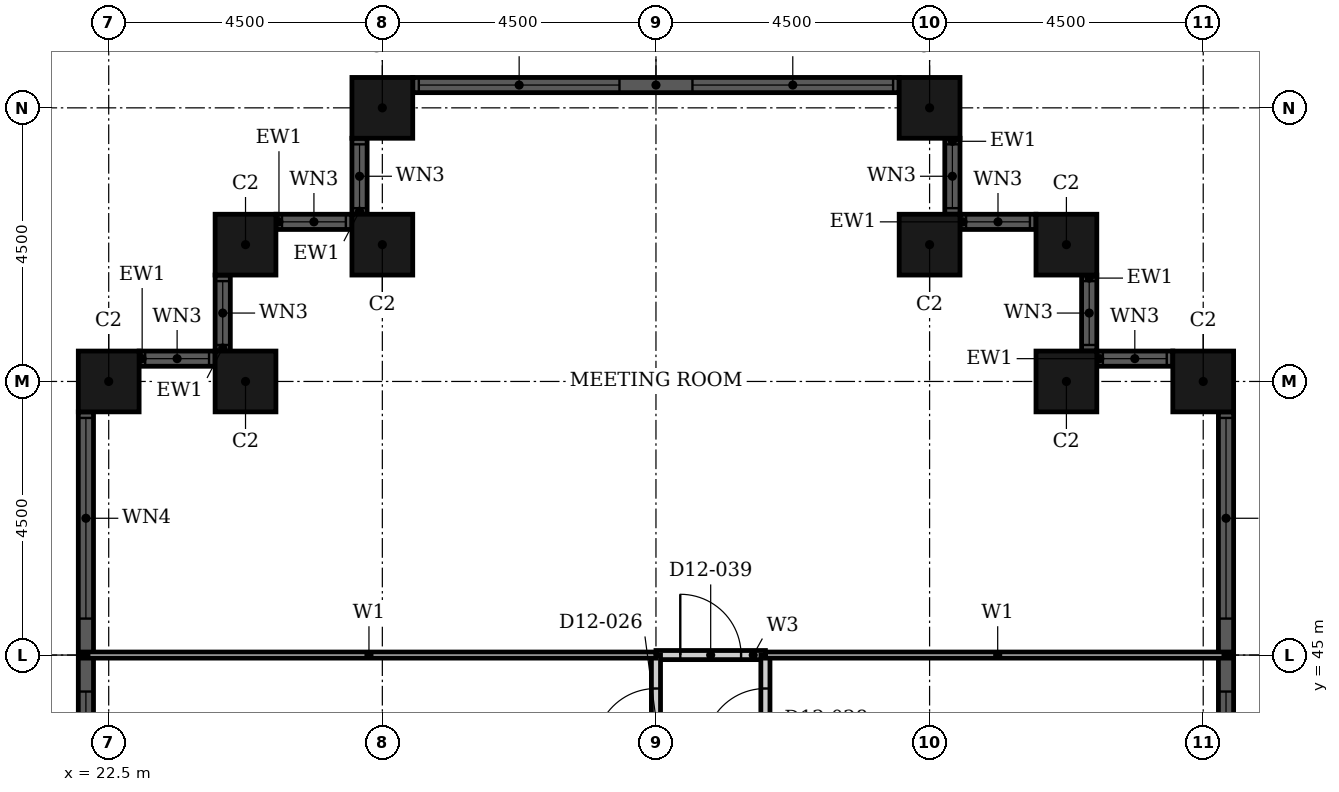
"""IFC4 building model, lengths in metres.
Left out: names, types, materials, properties, quantities, classifications, styles, units other than length and angle.
Written with IfcOpenShell. Run it as: python <this file> out.ifc"""

import sys

from ifc_helpers import new_model, si_unit, direction, frame, frame_2d, origin, origin_2d, place, context, subcontext, project, spatial, rectangle, hollow_rectangle, extrude, element, fill, save


model = new_model("IFC4")
c1 = context("Model", 3, precision=1e-05, world=origin(), true_north=direction((0.0, 1.0)))
c2 = subcontext(c1, "Body", "Model", "MODEL_VIEW")
j1 = project(units=[si_unit("LENGTHUNIT", "METRE"), si_unit("PLANEANGLEUNIT", "RADIAN")], contexts=[c1])
p1 = place(None, origin())
s1 = spatial("IfcSite", under=j1, at=p1, CompositionType="ELEMENT")
p2 = place(p1, origin())
s2 = spatial("IfcBuilding", under=s1, at=p2, CompositionType="ELEMENT")
p3 = place(p2, frame((0.0, 0.0, 56.4)))
s3 = spatial("IfcBuildingStorey", under=s2, at=p3, CompositionType="ELEMENT", Elevation=56.4)
for number, where, z_axis, x_axis in (
    (1, (40.5, 49.5, 0.0), (0.0, 0.0, 1.0), (1.0, 0.0, 0.0)),
    (2, (38.25, 49.5, 0.0), (0.0, 0.0, 1.0), (1.0, 0.0, 0.0)),
    (3, (38.25, 51.75, 0.0), (0.0, 0.0, 1.0), (1.0, 0.0, 0.0)),
    (4, (36.0, 51.75, 0.0), (0.0, 0.0, 1.0), (1.0, 0.0, 0.0)),
    (5, (36.0, 54.0, 0.0), (0.0, 0.0, 1.0), (1.0, 0.0, 0.0)),
    (6, (27.0, 54.0, 0.0), (0.0, 0.0, 1.0), (1.0, 0.0, 0.0)),
    (7, (27.0, 51.75, 0.0), (0.0, 0.0, 1.0), (1.0, 0.0, 0.0)),
    (8, (24.75, 51.75, 0.0), (0.0, 0.0, 1.0), (1.0, 0.0, 0.0)),
    (9, (24.75, 49.5, 0.0), (0.0, 0.0, 1.0), (1.0, 0.0, 0.0)),
    (10, (22.5, 49.5, 0.0), (0.0, 0.0, 1.0), (1.0, 0.0, 0.0)),
):
    element("IfcColumn", number, at=place(p3, frame(where, z_axis=z_axis, x_axis=x_axis)), inside=s3, PredefinedType="COLUMN", context=c2, shape_type="SweptSolid", body=[
        extrude(hollow_rectangle(XDim=1.0, YDim=1.0, WallThickness=0.032, at=origin_2d()), origin(), (0.0, 0.0, 1.0), 3.6),
    ])
p4 = place(p3, frame((40.875, 41.0, 0.0), z_axis=(0.0, 0.0, 1.0), x_axis=(0.0, 1.0, 0.0)))
e11 = element("IfcWall", 11, at=p4, inside=s3, PredefinedType="SOLIDWALL", context=c2, shape_type="SweptSolid", body=[
    extrude(rectangle(XDim=8.0, YDim=0.25, at=frame_2d((4.0, 0.0))), origin(), (0.0, 0.0, 1.0), 3.6),
])
p5 = place(p4, frame((0.1, 0.0, 0.9)))
e12 = element("IfcOpeningElement", 12, at=p5, cuts=e11, PredefinedType="OPENING", context=c2, shape_type="SweptSolid", body=[
    extrude(rectangle(XDim=3.3, YDim=2.08, at=frame_2d((1.65, 1.04))), frame((0.0, 0.135, 0.0), z_axis=(0.0, -1.0, 0.0), x_axis=(1.0, 0.0, 0.0)), (0.0, 0.0, 1.0), 0.27),
])
p6 = place(p4, frame((4.6, 0.0, 0.9)))
e13 = element("IfcOpeningElement", 13, at=p6, cuts=e11, PredefinedType="OPENING", context=c2, shape_type="SweptSolid", body=[
    extrude(rectangle(XDim=3.3, YDim=2.08, at=frame_2d((1.65, 1.04))), frame((0.0, 0.135, 0.0), z_axis=(0.0, -1.0, 0.0), x_axis=(1.0, 0.0, 0.0)), (0.0, 0.0, 1.0), 0.27),
])
p7 = place(p3, frame((40.0, 49.875, 0.0), z_axis=(0.0, 0.0, 1.0), x_axis=(-1.0, 0.0, 0.0)))
e14 = element("IfcWall", 14, at=p7, inside=s3, PredefinedType="SOLIDWALL", context=c2, shape_type="SweptSolid", body=[
    extrude(rectangle(XDim=1.25, YDim=0.25, at=frame_2d((0.625, 0.0))), origin(), (0.0, 0.0, 1.0), 3.6),
])
p8 = place(p7, frame((0.1, 0.0, 0.9)))
e15 = element("IfcOpeningElement", 15, at=p8, cuts=e14, PredefinedType="OPENING", context=c2, shape_type="SweptSolid", body=[
    extrude(rectangle(XDim=1.05, YDim=2.08, at=frame_2d((0.525, 1.04))), frame((0.0, 0.135, 0.0), z_axis=(0.0, -1.0, 0.0), x_axis=(1.0, 0.0, 0.0)), (0.0, 0.0, 1.0), 0.27),
])
p9 = place(p3, frame((38.625, 50.0, 0.0), z_axis=(0.0, 0.0, 1.0), x_axis=(0.0, 1.0, 0.0)))
e16 = element("IfcWall", 16, at=p9, inside=s3, PredefinedType="SOLIDWALL", context=c2, shape_type="SweptSolid", body=[
    extrude(rectangle(XDim=1.25, YDim=0.25, at=frame_2d((0.625, 0.0))), origin(), (0.0, 0.0, 1.0), 3.6),
])
p10 = place(p9, frame((0.1, 0.0, 0.9)))
e17 = element("IfcOpeningElement", 17, at=p10, cuts=e16, PredefinedType="OPENING", context=c2, shape_type="SweptSolid", body=[
    extrude(rectangle(XDim=1.05, YDim=2.08, at=frame_2d((0.525, 1.04))), frame((0.0, 0.135, 0.0), z_axis=(0.0, -1.0, 0.0), x_axis=(1.0, 0.0, 0.0)), (0.0, 0.0, 1.0), 0.27),
])
p11 = place(p3, frame((37.75, 52.125, 0.0), z_axis=(0.0, 0.0, 1.0), x_axis=(-1.0, 0.0, 0.0)))
e18 = element("IfcWall", 18, at=p11, inside=s3, PredefinedType="SOLIDWALL", context=c2, shape_type="SweptSolid", body=[
    extrude(rectangle(XDim=1.25, YDim=0.25, at=frame_2d((0.625, 0.0))), origin(), (0.0, 0.0, 1.0), 3.6),
])
p12 = place(p11, frame((0.1, 0.0, 0.9)))
e19 = element("IfcOpeningElement", 19, at=p12, cuts=e18, PredefinedType="OPENING", context=c2, shape_type="SweptSolid", body=[
    extrude(rectangle(XDim=1.05, YDim=2.08, at=frame_2d((0.525, 1.04))), frame((0.0, 0.135, 0.0), z_axis=(0.0, -1.0, 0.0), x_axis=(1.0, 0.0, 0.0)), (0.0, 0.0, 1.0), 0.27),
])
p13 = place(p3, frame((36.375, 52.25, 0.0), z_axis=(0.0, 0.0, 1.0), x_axis=(0.0, 1.0, 0.0)))
e20 = element("IfcWall", 20, at=p13, inside=s3, PredefinedType="SOLIDWALL", context=c2, shape_type="SweptSolid", body=[
    extrude(rectangle(XDim=1.25, YDim=0.25, at=frame_2d((0.625, 0.0))), origin(), (0.0, 0.0, 1.0), 3.6),
])
p14 = place(p13, frame((0.1, 0.0, 0.9)))
e21 = element("IfcOpeningElement", 21, at=p14, cuts=e20, PredefinedType="OPENING", context=c2, shape_type="SweptSolid", body=[
    extrude(rectangle(XDim=1.05, YDim=2.08, at=frame_2d((0.525, 1.04))), frame((0.0, 0.135, 0.0), z_axis=(0.0, -1.0, 0.0), x_axis=(1.0, 0.0, 0.0)), (0.0, 0.0, 1.0), 0.27),
])
p15 = place(p3, frame((35.5, 54.375, 0.0), z_axis=(0.0, 0.0, 1.0), x_axis=(-1.0, 0.0, 0.0)))
e22 = element("IfcWall", 22, at=p15, inside=s3, PredefinedType="SOLIDWALL", context=c2, shape_type="SweptSolid", body=[
    extrude(rectangle(XDim=8.0, YDim=0.25, at=frame_2d((4.0, 0.0))), origin(), (0.0, 0.0, 1.0), 3.6),
])
p16 = place(p15, frame((0.1, 0.0, 0.9)))
e23 = element("IfcOpeningElement", 23, at=p16, cuts=e22, PredefinedType="OPENING", context=c2, shape_type="SweptSolid", body=[
    extrude(rectangle(XDim=3.3, YDim=2.08, at=frame_2d((1.65, 1.04))), frame((0.0, 0.135, 0.0), z_axis=(0.0, -1.0, 0.0), x_axis=(1.0, 0.0, 0.0)), (0.0, 0.0, 1.0), 0.27),
])
p17 = place(p15, frame((4.6, 0.0, 0.9)))
e24 = element("IfcOpeningElement", 24, at=p17, cuts=e22, PredefinedType="OPENING", context=c2, shape_type="SweptSolid", body=[
    extrude(rectangle(XDim=3.3, YDim=2.08, at=frame_2d((1.65, 1.04))), frame((0.0, 0.135, 0.0), z_axis=(0.0, -1.0, 0.0), x_axis=(1.0, 0.0, 0.0)), (0.0, 0.0, 1.0), 0.27),
])
p18 = place(p3, frame((26.625, 53.5, 0.0), z_axis=(0.0, 0.0, 1.0), x_axis=(0.0, -1.0, 0.0)))
e25 = element("IfcWall", 25, at=p18, inside=s3, PredefinedType="SOLIDWALL", context=c2, shape_type="SweptSolid", body=[
    extrude(rectangle(XDim=1.25, YDim=0.25, at=frame_2d((0.625, 0.0))), origin(), (0.0, 0.0, 1.0), 3.6),
])
p19 = place(p18, frame((0.1, 0.0, 0.9)))
e26 = element("IfcOpeningElement", 26, at=p19, cuts=e25, PredefinedType="OPENING", context=c2, shape_type="SweptSolid", body=[
    extrude(rectangle(XDim=1.05, YDim=2.08, at=frame_2d((0.525, 1.04))), frame((0.0, 0.135, 0.0), z_axis=(0.0, -1.0, 0.0), x_axis=(1.0, 0.0, 0.0)), (0.0, 0.0, 1.0), 0.27),
])
p20 = place(p3, frame((26.5, 52.125, 0.0), z_axis=(0.0, 0.0, 1.0), x_axis=(-1.0, 0.0, 0.0)))
e27 = element("IfcWall", 27, at=p20, inside=s3, PredefinedType="SOLIDWALL", context=c2, shape_type="SweptSolid", body=[
    extrude(rectangle(XDim=1.25, YDim=0.25, at=frame_2d((0.625, 0.0))), origin(), (0.0, 0.0, 1.0), 3.6),
])
p21 = place(p20, frame((0.1, 0.0, 0.9)))
e28 = element("IfcOpeningElement", 28, at=p21, cuts=e27, PredefinedType="OPENING", context=c2, shape_type="SweptSolid", body=[
    extrude(rectangle(XDim=1.05, YDim=2.08, at=frame_2d((0.525, 1.04))), frame((0.0, 0.135, 0.0), z_axis=(0.0, -1.0, 0.0), x_axis=(1.0, 0.0, 0.0)), (0.0, 0.0, 1.0), 0.27),
])
p22 = place(p3, frame((24.375, 51.25, 0.0), z_axis=(0.0, 0.0, 1.0), x_axis=(0.0, -1.0, 0.0)))
e29 = element("IfcWall", 29, at=p22, inside=s3, PredefinedType="SOLIDWALL", context=c2, shape_type="SweptSolid", body=[
    extrude(rectangle(XDim=1.25, YDim=0.25, at=frame_2d((0.625, 0.0))), origin(), (0.0, 0.0, 1.0), 3.6),
])
p23 = place(p22, frame((0.1, 0.0, 0.9)))
e30 = element("IfcOpeningElement", 30, at=p23, cuts=e29, PredefinedType="OPENING", context=c2, shape_type="SweptSolid", body=[
    extrude(rectangle(XDim=1.05, YDim=2.08, at=frame_2d((0.525, 1.04))), frame((0.0, 0.135, 0.0), z_axis=(0.0, -1.0, 0.0), x_axis=(1.0, 0.0, 0.0)), (0.0, 0.0, 1.0), 0.27),
])
p24 = place(p3, frame((24.25, 49.875, 0.0), z_axis=(0.0, 0.0, 1.0), x_axis=(-1.0, 0.0, 0.0)))
e31 = element("IfcWall", 31, at=p24, inside=s3, PredefinedType="SOLIDWALL", context=c2, shape_type="SweptSolid", body=[
    extrude(rectangle(XDim=1.25, YDim=0.25, at=frame_2d((0.625, 0.0))), origin(), (0.0, 0.0, 1.0), 3.6),
])
p25 = place(p24, frame((0.1, 0.0, 0.9)))
e32 = element("IfcOpeningElement", 32, at=p25, cuts=e31, PredefinedType="OPENING", context=c2, shape_type="SweptSolid", body=[
    extrude(rectangle(XDim=1.05, YDim=2.08, at=frame_2d((0.525, 1.04))), frame((0.0, 0.135, 0.0), z_axis=(0.0, -1.0, 0.0), x_axis=(1.0, 0.0, 0.0)), (0.0, 0.0, 1.0), 0.27),
])
p26 = place(p3, frame((22.125, 49.0, 0.0), z_axis=(0.0, 0.0, 1.0), x_axis=(0.0, -1.0, 0.0)))
e33 = element("IfcWall", 33, at=p26, inside=s3, PredefinedType="SOLIDWALL", context=c2, shape_type="SweptSolid", body=[
    extrude(rectangle(XDim=8.0, YDim=0.25, at=frame_2d((4.0, 0.0))), origin(), (0.0, 0.0, 1.0), 3.6),
])
p27 = place(p26, frame((0.1, 0.0, 0.9)))
e34 = element("IfcOpeningElement", 34, at=p27, cuts=e33, PredefinedType="OPENING", context=c2, shape_type="SweptSolid", body=[
    extrude(rectangle(XDim=3.3, YDim=2.08, at=frame_2d((1.65, 1.04))), frame((0.0, 0.135, 0.0), z_axis=(0.0, -1.0, 0.0), x_axis=(1.0, 0.0, 0.0)), (0.0, 0.0, 1.0), 0.27),
])
p28 = place(p26, frame((4.6, 0.0, 0.9)))
e35 = element("IfcOpeningElement", 35, at=p28, cuts=e33, PredefinedType="OPENING", context=c2, shape_type="SweptSolid", body=[
    extrude(rectangle(XDim=3.3, YDim=2.08, at=frame_2d((1.65, 1.04))), frame((0.0, 0.135, 0.0), z_axis=(0.0, -1.0, 0.0), x_axis=(1.0, 0.0, 0.0)), (0.0, 0.0, 1.0), 0.27),
])
p29 = place(p3, frame((31.5, 45.0, 0.0), z_axis=(0.0, 0.0, 1.0), x_axis=(1.0, 0.0, 0.0)))
e36 = element("IfcWall", 36, at=p29, inside=s3, PredefinedType="PARTITIONING", context=c2, shape_type="SweptSolid", body=[
    extrude(rectangle(XDim=1.8, YDim=0.15, at=frame_2d((0.9, 0.0))), origin(), (0.0, 0.0, 1.0), 3.3),
])
p30 = place(p29, frame((0.4, 0.0, 0.0)))
e37 = element("IfcOpeningElement", 37, at=p30, cuts=e36, PredefinedType="OPENING", context=c2, shape_type="SweptSolid", body=[
    extrude(rectangle(XDim=1.0, YDim=2.1, at=frame_2d((0.5, 1.05))), frame((0.0, 0.085, 0.0), z_axis=(0.0, -1.0, 0.0), x_axis=(1.0, 0.0, 0.0)), (0.0, 0.0, 1.0), 0.17),
])
p31 = place(p3, frame((31.5, 33.3, 0.0), z_axis=(0.0, 0.0, 1.0), x_axis=(0.0, 1.0, 0.0)))
e38 = element("IfcWall", 38, at=p31, inside=s3, PredefinedType="PARTITIONING", context=c2, shape_type="SweptSolid", body=[
    extrude(rectangle(XDim=11.7, YDim=0.15, at=frame_2d((5.85, 0.0))), origin(), (0.0, 0.0, 1.0), 2.58),
])
p32 = place(p31, frame((10.15, 0.0, 0.0)))
e39 = element("IfcOpeningElement", 39, at=p32, cuts=e38, PredefinedType="OPENING", context=c2, shape_type="SweptSolid", body=[
    extrude(rectangle(XDim=1.0, YDim=2.1, at=frame_2d((0.5, 1.05))), frame((0.0, 0.085, 0.0), z_axis=(0.0, -1.0, 0.0), x_axis=(1.0, 0.0, 0.0)), (0.0, 0.0, 1.0), 0.17),
])
p33 = place(p3, frame((33.3, 33.3, 0.0), z_axis=(0.0, 0.0, 1.0), x_axis=(0.0, 1.0, 0.0)))
e40 = element("IfcWall", 40, at=p33, inside=s3, PredefinedType="PARTITIONING", context=c2, shape_type="SweptSolid", body=[
    extrude(rectangle(XDim=11.7, YDim=0.15, at=frame_2d((5.85, 0.0))), origin(), (0.0, 0.0, 1.0), 3.3),
])
p34 = place(p33, frame((10.15, 0.0, 0.0)))
e41 = element("IfcOpeningElement", 41, at=p34, cuts=e40, PredefinedType="OPENING", context=c2, shape_type="SweptSolid", body=[
    extrude(rectangle(XDim=1.0, YDim=2.1, at=frame_2d((0.5, 1.05))), frame((0.0, 0.085, 0.0), z_axis=(0.0, -1.0, 0.0), x_axis=(1.0, 0.0, 0.0)), (0.0, 0.0, 1.0), 0.17),
])
p35 = place(p3, frame((33.3, 45.0, 0.0), z_axis=(0.0, 0.0, 1.0), x_axis=(1.0, 0.0, 0.0)))
e42 = element("IfcWall", 42, at=p35, inside=s3, PredefinedType="PARTITIONING", context=c2, shape_type="SweptSolid", body=[
    extrude(rectangle(XDim=7.64, YDim=0.1, at=frame_2d((3.82, 0.0))), origin(), (0.0, 0.0, 1.0), 3.3),
])
p36 = place(p3, frame((22.06, 45.0, 0.0), z_axis=(0.0, 0.0, 1.0), x_axis=(1.0, 0.0, 0.0)))
e43 = element("IfcWall", 43, at=p36, inside=s3, PredefinedType="PARTITIONING", context=c2, shape_type="SweptSolid", body=[
    extrude(rectangle(XDim=9.44, YDim=0.1, at=frame_2d((4.72, 0.0))), origin(), (0.0, 0.0, 1.0), 3.3),
])
p37 = place(p5, origin())
e44 = element("IfcWindow", 44, at=p37, inside=s3, PartitioningType="SINGLE_PANEL", PredefinedType="WINDOW", context=c2, shape_type="SweptSolid", body=[
    extrude(rectangle(XDim=3.3, YDim=2.08, at=frame_2d((1.65, 1.04))), frame((0.0, 0.03, 0.0), z_axis=(0.0, -1.0, 0.0), x_axis=(1.0, 0.0, 0.0)), (0.0, 0.0, 1.0), 0.06),
])
fill(e12, e44)
p38 = place(p6, origin())
e45 = element("IfcWindow", 45, at=p38, inside=s3, PartitioningType="SINGLE_PANEL", PredefinedType="WINDOW", context=c2, shape_type="SweptSolid", body=[
    extrude(rectangle(XDim=3.3, YDim=2.08, at=frame_2d((1.65, 1.04))), frame((0.0, 0.03, 0.0), z_axis=(0.0, -1.0, 0.0), x_axis=(1.0, 0.0, 0.0)), (0.0, 0.0, 1.0), 0.06),
])
fill(e13, e45)
p39 = place(p8, origin())
e46 = element("IfcWindow", 46, at=p39, inside=s3, PartitioningType="SINGLE_PANEL", PredefinedType="WINDOW", context=c2, shape_type="SweptSolid", body=[
    extrude(rectangle(XDim=1.05, YDim=2.08, at=frame_2d((0.525, 1.04))), frame((0.0, 0.03, 0.0), z_axis=(0.0, -1.0, 0.0), x_axis=(1.0, 0.0, 0.0)), (0.0, 0.0, 1.0), 0.06),
])
fill(e15, e46)
p40 = place(p10, origin())
e47 = element("IfcWindow", 47, at=p40, inside=s3, PartitioningType="SINGLE_PANEL", PredefinedType="WINDOW", context=c2, shape_type="SweptSolid", body=[
    extrude(rectangle(XDim=1.05, YDim=2.08, at=frame_2d((0.525, 1.04))), frame((0.0, 0.03, 0.0), z_axis=(0.0, -1.0, 0.0), x_axis=(1.0, 0.0, 0.0)), (0.0, 0.0, 1.0), 0.06),
])
fill(e17, e47)
p41 = place(p12, origin())
e48 = element("IfcWindow", 48, at=p41, inside=s3, PartitioningType="SINGLE_PANEL", PredefinedType="WINDOW", context=c2, shape_type="SweptSolid", body=[
    extrude(rectangle(XDim=1.05, YDim=2.08, at=frame_2d((0.525, 1.04))), frame((0.0, 0.03, 0.0), z_axis=(0.0, -1.0, 0.0), x_axis=(1.0, 0.0, 0.0)), (0.0, 0.0, 1.0), 0.06),
])
fill(e19, e48)
p42 = place(p14, origin())
e49 = element("IfcWindow", 49, at=p42, inside=s3, PartitioningType="SINGLE_PANEL", PredefinedType="WINDOW", context=c2, shape_type="SweptSolid", body=[
    extrude(rectangle(XDim=1.05, YDim=2.08, at=frame_2d((0.525, 1.04))), frame((0.0, 0.03, 0.0), z_axis=(0.0, -1.0, 0.0), x_axis=(1.0, 0.0, 0.0)), (0.0, 0.0, 1.0), 0.06),
])
fill(e21, e49)
p43 = place(p16, origin())
e50 = element("IfcWindow", 50, at=p43, inside=s3, PartitioningType="SINGLE_PANEL", PredefinedType="WINDOW", context=c2, shape_type="SweptSolid", body=[
    extrude(rectangle(XDim=3.3, YDim=2.08, at=frame_2d((1.65, 1.04))), frame((0.0, 0.03, 0.0), z_axis=(0.0, -1.0, 0.0), x_axis=(1.0, 0.0, 0.0)), (0.0, 0.0, 1.0), 0.06),
])
fill(e23, e50)
p44 = place(p17, origin())
e51 = element("IfcWindow", 51, at=p44, inside=s3, PartitioningType="SINGLE_PANEL", PredefinedType="WINDOW", context=c2, shape_type="SweptSolid", body=[
    extrude(rectangle(XDim=3.3, YDim=2.08, at=frame_2d((1.65, 1.04))), frame((0.0, 0.03, 0.0), z_axis=(0.0, -1.0, 0.0), x_axis=(1.0, 0.0, 0.0)), (0.0, 0.0, 1.0), 0.06),
])
fill(e24, e51)
p45 = place(p19, origin())
e52 = element("IfcWindow", 52, at=p45, inside=s3, PartitioningType="SINGLE_PANEL", PredefinedType="WINDOW", context=c2, shape_type="SweptSolid", body=[
    extrude(rectangle(XDim=1.05, YDim=2.08, at=frame_2d((0.525, 1.04))), frame((0.0, 0.03, 0.0), z_axis=(0.0, -1.0, 0.0), x_axis=(1.0, 0.0, 0.0)), (0.0, 0.0, 1.0), 0.06),
])
fill(e26, e52)
p46 = place(p21, origin())
e53 = element("IfcWindow", 53, at=p46, inside=s3, PartitioningType="SINGLE_PANEL", PredefinedType="WINDOW", context=c2, shape_type="SweptSolid", body=[
    extrude(rectangle(XDim=1.05, YDim=2.08, at=frame_2d((0.525, 1.04))), frame((0.0, 0.03, 0.0), z_axis=(0.0, -1.0, 0.0), x_axis=(1.0, 0.0, 0.0)), (0.0, 0.0, 1.0), 0.06),
])
fill(e28, e53)
p47 = place(p23, origin())
e54 = element("IfcWindow", 54, at=p47, inside=s3, PartitioningType="SINGLE_PANEL", PredefinedType="WINDOW", context=c2, shape_type="SweptSolid", body=[
    extrude(rectangle(XDim=1.05, YDim=2.08, at=frame_2d((0.525, 1.04))), frame((0.0, 0.03, 0.0), z_axis=(0.0, -1.0, 0.0), x_axis=(1.0, 0.0, 0.0)), (0.0, 0.0, 1.0), 0.06),
])
fill(e30, e54)
p48 = place(p25, origin())
e55 = element("IfcWindow", 55, at=p48, inside=s3, PartitioningType="SINGLE_PANEL", PredefinedType="WINDOW", context=c2, shape_type="SweptSolid", body=[
    extrude(rectangle(XDim=1.05, YDim=2.08, at=frame_2d((0.525, 1.04))), frame((0.0, 0.03, 0.0), z_axis=(0.0, -1.0, 0.0), x_axis=(1.0, 0.0, 0.0)), (0.0, 0.0, 1.0), 0.06),
])
fill(e32, e55)
p49 = place(p27, origin())
e56 = element("IfcWindow", 56, at=p49, inside=s3, PartitioningType="SINGLE_PANEL", PredefinedType="WINDOW", context=c2, shape_type="SweptSolid", body=[
    extrude(rectangle(XDim=3.3, YDim=2.08, at=frame_2d((1.65, 1.04))), frame((0.0, 0.03, 0.0), z_axis=(0.0, -1.0, 0.0), x_axis=(1.0, 0.0, 0.0)), (0.0, 0.0, 1.0), 0.06),
])
fill(e34, e56)
p50 = place(p28, origin())
e57 = element("IfcWindow", 57, at=p50, inside=s3, PartitioningType="SINGLE_PANEL", PredefinedType="WINDOW", context=c2, shape_type="SweptSolid", body=[
    extrude(rectangle(XDim=3.3, YDim=2.08, at=frame_2d((1.65, 1.04))), frame((0.0, 0.03, 0.0), z_axis=(0.0, -1.0, 0.0), x_axis=(1.0, 0.0, 0.0)), (0.0, 0.0, 1.0), 0.06),
])
fill(e35, e57)
p51 = place(p32, origin())
e58 = element("IfcDoor", 58, at=p51, inside=s3, OperationType="SINGLE_SWING_RIGHT", PredefinedType="DOOR", context=c2, shape_type="SweptSolid", body=[
    extrude(rectangle(XDim=1.0, YDim=2.1, at=frame_2d((0.5, 1.05))), frame((0.0, 0.025, 0.0), z_axis=(0.0, -1.0, 0.0), x_axis=(1.0, 0.0, 0.0)), (0.0, 0.0, 1.0), 0.05),
])
fill(e39, e58)
p52 = place(p34, origin())
e59 = element("IfcDoor", 59, at=p52, inside=s3, OperationType="SINGLE_SWING_RIGHT", PredefinedType="DOOR", context=c2, shape_type="SweptSolid", body=[
    extrude(rectangle(XDim=1.0, YDim=2.1, at=frame_2d((0.5, 1.05))), frame((0.0, 0.025, 0.0), z_axis=(0.0, -1.0, 0.0), x_axis=(1.0, 0.0, 0.0)), (0.0, 0.0, 1.0), 0.05),
])
fill(e41, e59)
p53 = place(p30, origin())
e60 = element("IfcDoor", 60, at=p53, inside=s3, OperationType="SINGLE_SWING_LEFT", PredefinedType="DOOR", context=c2, shape_type="SweptSolid", body=[
    extrude(rectangle(XDim=1.0, YDim=2.1, at=frame_2d((0.5, 1.05))), frame((0.0, 0.025, 0.0), z_axis=(0.0, -1.0, 0.0), x_axis=(1.0, 0.0, 0.0)), (0.0, 0.0, 1.0), 0.05),
])
fill(e37, e60)
save(model, sys.argv[1])
